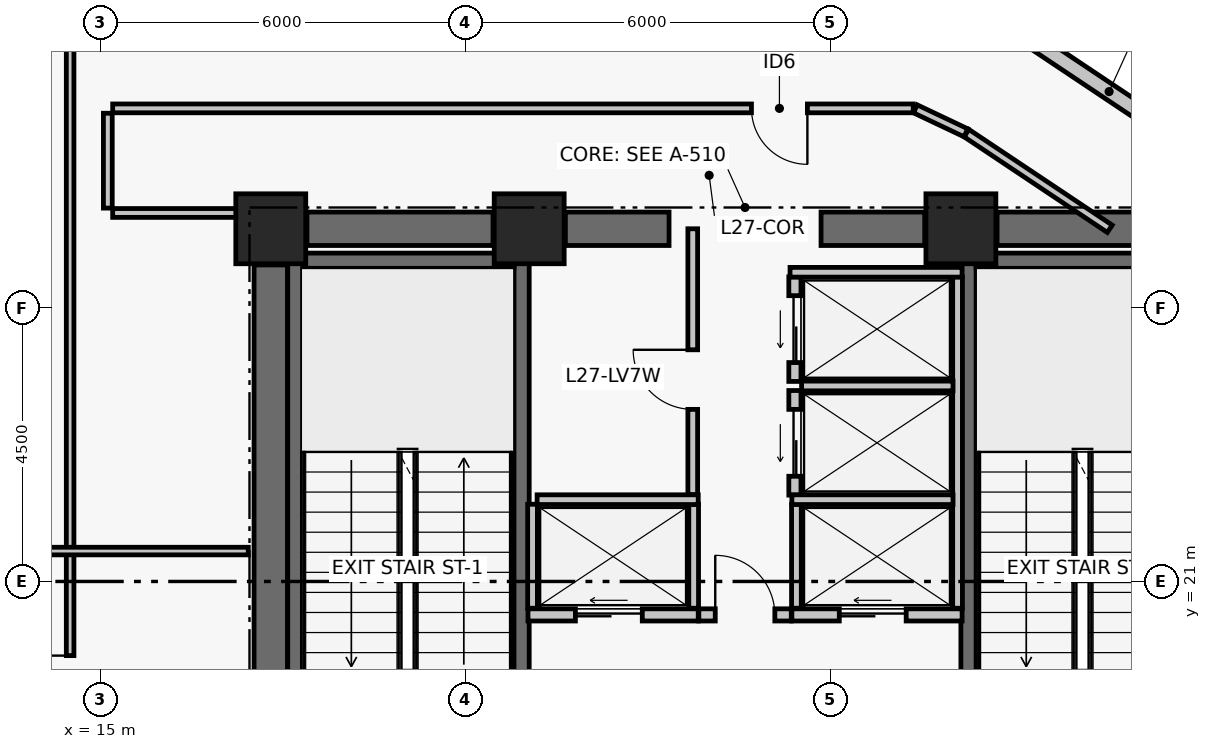
"""IFC4 building model, lengths in metres.
Left out: names, types, materials, properties, quantities, classifications, styles, units other than length and angle.
Written with IfcOpenShell. Run it as: python <this file> out.ifc"""

import sys

from ifc_helpers import new_model, si_unit, direction, frame, frame_2d, origin, origin_2d, place, context, subcontext, project, spatial, rectangle, extrude, element, fill, save


model = new_model("IFC4")
c1 = context("Model", 3, precision=1e-05, world=origin(), true_north=direction((0.0, 1.0)))
c2 = subcontext(c1, "Body", "Model", "MODEL_VIEW")
j1 = project(units=[si_unit("LENGTHUNIT", "METRE"), si_unit("PLANEANGLEUNIT", "RADIAN")], contexts=[c1])
p1 = place(None, origin())
s1 = spatial("IfcSite", under=j1, at=p1, CompositionType="ELEMENT")
p2 = place(p1, origin())
s2 = spatial("IfcBuilding", under=s1, at=p2, CompositionType="ELEMENT")
p3 = place(p2, frame((0.0, 0.0, 111.42)))
s3 = spatial("IfcBuildingStorey", under=s2, at=p3, CompositionType="ELEMENT", Elevation=111.42)
for number, where, z_axis, x_axis in (
    (1, (17.8, 26.8, 0.0), (0.0, 0.0, 1.0), (1.0, 0.0, 0.0)),
    (2, (22.05, 26.8, 0.0), (0.0, 0.0, 1.0), (1.0, 0.0, 0.0)),
    (3, (29.15, 26.8, 0.0), (0.0, 0.0, 1.0), (1.0, 0.0, 0.0)),
):
    element("IfcColumn", number, at=place(p3, frame(where, z_axis=z_axis, x_axis=x_axis)), inside=s3, PredefinedType="COLUMN", context=c2, shape_type="SweptSolid", body=[
        extrude(rectangle(XDim=1.15, YDim=1.15, at=origin_2d()), origin(), (0.0, 0.0, 1.0), 3.72),
    ])
p4 = place(p3, frame((18.395, 26.8, 0.0), z_axis=(0.0, 0.0, 1.0), x_axis=(1.0, 0.0, 0.0)))
e4 = element("IfcWall", 4, at=p4, inside=s3, PredefinedType="SHEAR", context=c2, shape_type="SweptSolid", body=[
    extrude(rectangle(XDim=3.06, YDim=0.55, at=frame_2d((1.53, 0.0))), origin(), (0.0, 0.0, 1.0), 3.47),
])
p5 = place(p3, frame((22.645, 26.8, 0.0), z_axis=(0.0, 0.0, 1.0), x_axis=(1.0, 0.0, 0.0)))
e5 = element("IfcWall", 5, at=p5, inside=s3, PredefinedType="SHEAR", context=c2, shape_type="SweptSolid", body=[
    extrude(rectangle(XDim=1.705, YDim=0.55, at=frame_2d((0.853, 0.0))), origin(), (0.0, 0.0, 1.0), 3.47),
])
p6 = place(p3, frame((26.85, 26.8, 0.0), z_axis=(0.0, 0.0, 1.0), x_axis=(1.0, 0.0, 0.0)))
e6 = element("IfcWall", 6, at=p6, inside=s3, PredefinedType="SHEAR", context=c2, shape_type="SweptSolid", body=[
    extrude(rectangle(XDim=1.705, YDim=0.55, at=frame_2d((0.853, 0.0))), origin(), (0.0, 0.0, 1.0), 3.47),
])
p7 = place(p3, frame((29.745, 26.8, 0.0), z_axis=(0.0, 0.0, 1.0), x_axis=(1.0, 0.0, 0.0)))
e7 = element("IfcWall", 7, at=p7, inside=s3, PredefinedType="SHEAR", context=c2, shape_type="SweptSolid", body=[
    extrude(rectangle(XDim=3.06, YDim=0.55, at=frame_2d((1.53, 0.0))), origin(), (0.0, 0.0, 1.0), 3.47),
])
p8 = place(p3, frame((17.8, 17.795, 0.0), z_axis=(0.0, 0.0, 1.0), x_axis=(0.0, 1.0, 0.0)))
e8 = element("IfcWall", 8, at=p8, inside=s3, PredefinedType="SHEAR", context=c2, shape_type="SweptSolid", body=[
    extrude(rectangle(XDim=8.41, YDim=0.55, at=frame_2d((4.205, 0.0))), origin(), (0.0, 0.0, 1.0), 3.47),
])
p9 = place(p3, frame((18.204, 17.6, 0.0), z_axis=(0.0, 0.0, 1.0), x_axis=(0.0, 1.0, 0.0)))
e9 = element("IfcWall", 9, at=p9, inside=s3, PredefinedType="SHEAR", context=c2, shape_type="SweptSolid", body=[
    extrude(rectangle(XDim=8.8, YDim=0.25, at=frame_2d((4.4, 0.0))), origin(), (0.0, 0.0, 1.0), 3.47),
])
p10 = place(p3, frame((21.925, 17.6, 0.0), z_axis=(0.0, 0.0, 1.0), x_axis=(0.0, 1.0, 0.0)))
e10 = element("IfcWall", 10, at=p10, inside=s3, PredefinedType="SHEAR", context=c2, shape_type="SweptSolid", body=[
    extrude(rectangle(XDim=8.8, YDim=0.25, at=frame_2d((4.4, 0.0))), origin(), (0.0, 0.0, 1.0), 3.47),
])
p11 = place(p10, frame((0.35, 0.0, 0.0)))
e11 = element("IfcOpeningElement", 11, at=p11, cuts=e10, PredefinedType="OPENING", context=c2, shape_type="SweptSolid", body=[
    extrude(rectangle(XDim=1.05, YDim=2.08, at=frame_2d((0.525, 1.04))), frame((0.0, 0.135, 0.0), z_axis=(0.0, -1.0, 0.0), x_axis=(1.0, 0.0, 0.0)), (0.0, 0.0, 1.0), 0.27),
])
p12 = place(p3, frame((18.329, 26.275, 0.0), z_axis=(0.0, 0.0, 1.0), x_axis=(1.0, 0.0, 0.0)))
e12 = element("IfcWall", 12, at=p12, inside=s3, PredefinedType="SHEAR", context=c2, shape_type="SweptSolid", body=[
    extrude(rectangle(XDim=3.471, YDim=0.25, at=frame_2d((1.735, 0.0))), origin(), (0.0, 0.0, 1.0), 3.47),
])
p13 = place(p3, frame((29.275, 17.6, 0.0), z_axis=(0.0, 0.0, 1.0), x_axis=(0.0, 1.0, 0.0)))
e13 = element("IfcWall", 13, at=p13, inside=s3, PredefinedType="SHEAR", context=c2, shape_type="SweptSolid", body=[
    extrude(rectangle(XDim=8.8, YDim=0.25, at=frame_2d((4.4, 0.0))), origin(), (0.0, 0.0, 1.0), 3.47),
])
p14 = place(p13, frame((0.35, 0.0, 0.0)))
e14 = element("IfcOpeningElement", 14, at=p14, cuts=e13, PredefinedType="OPENING", context=c2, shape_type="SweptSolid", body=[
    extrude(rectangle(XDim=1.05, YDim=2.08, at=frame_2d((0.525, 1.04))), frame((0.0, 0.135, 0.0), z_axis=(0.0, -1.0, 0.0), x_axis=(1.0, 0.0, 0.0)), (0.0, 0.0, 1.0), 0.27),
])
p15 = place(p3, frame((29.4, 26.275, 0.0), z_axis=(0.0, 0.0, 1.0), x_axis=(1.0, 0.0, 0.0)))
e15 = element("IfcWall", 15, at=p15, inside=s3, PredefinedType="SHEAR", context=c2, shape_type="SweptSolid", body=[
    extrude(rectangle(XDim=3.471, YDim=0.25, at=frame_2d((1.736, 0.0))), origin(), (0.0, 0.0, 1.0), 3.47),
])
p16 = place(p3, frame((30.07, 30.069, 0.0), z_axis=(0.0, 0.0, 1.0), x_axis=(0.831720838908, -0.555194061681, 0.0)))
e16 = element("IfcWall", 16, at=p16, inside=s3, PredefinedType="PARTITIONING", context=c2, shape_type="SweptSolid", body=[
    extrude(rectangle(XDim=3.65, YDim=0.26, at=frame_2d((1.825, 0.0))), origin(), (0.0, 0.0, 1.0), 2.9),
])
p17 = place(p3, frame((24.84, 20.45, 0.0), z_axis=(0.0, 0.0, 1.0), x_axis=(1.0, 0.0, 0.0)))
e17 = element("IfcWall", 17, at=p17, inside=s3, PredefinedType="PARTITIONING", context=c2, shape_type="SweptSolid", body=[
    extrude(rectangle(XDim=1.52, YDim=0.2, at=frame_2d((0.76, 0.0))), origin(), (0.0, 0.0, 1.0), 3.47),
])
p18 = place(p17, frame((0.27, 0.0, 0.0)))
e18 = element("IfcOpeningElement", 18, at=p18, cuts=e17, PredefinedType="OPENING", context=c2, shape_type="SweptSolid", body=[
    extrude(rectangle(XDim=0.98, YDim=2.06, at=frame_2d((0.49, 1.03))), frame((0.0, 0.11, 0.0), z_axis=(0.0, -1.0, 0.0), x_axis=(1.0, 0.0, 0.0)), (0.0, 0.0, 1.0), 0.22),
])
p19 = place(p3, frame((22.03, 20.45, 0.0), z_axis=(0.0, 0.0, 1.0), x_axis=(1.0, 0.0, 0.0)))
e19 = element("IfcWall", 19, at=p19, inside=s3, PredefinedType="PARTITIONING", context=c2, shape_type="SweptSolid", body=[
    extrude(rectangle(XDim=2.8, YDim=0.2, at=frame_2d((1.4, 0.0))), origin(), (0.0, 0.0, 1.0), 3.47),
])
p20 = place(p19, frame((0.78, 0.0, 0.0)))
e20 = element("IfcOpeningElement", 20, at=p20, cuts=e19, PredefinedType="OPENING", context=c2, shape_type="SweptSolid", body=[
    extrude(rectangle(XDim=1.1, YDim=2.08, at=frame_2d((0.55, 1.04))), frame((0.0, 0.11, 0.0), z_axis=(0.0, -1.0, 0.0), x_axis=(1.0, 0.0, 0.0)), (0.0, 0.0, 1.0), 0.22),
])
p21 = place(p3, frame((26.37, 20.45, 0.0), z_axis=(0.0, 0.0, 1.0), x_axis=(1.0, 0.0, 0.0)))
e21 = element("IfcWall", 21, at=p21, inside=s3, PredefinedType="PARTITIONING", context=c2, shape_type="SweptSolid", body=[
    extrude(rectangle(XDim=2.8, YDim=0.2, at=frame_2d((1.4, 0.0))), origin(), (0.0, 0.0, 1.0), 3.47),
])
p22 = place(p21, frame((0.78, 0.0, 0.0)))
e22 = element("IfcOpeningElement", 22, at=p22, cuts=e21, PredefinedType="OPENING", context=c2, shape_type="SweptSolid", body=[
    extrude(rectangle(XDim=1.1, YDim=2.08, at=frame_2d((0.55, 1.04))), frame((0.0, 0.11, 0.0), z_axis=(0.0, -1.0, 0.0), x_axis=(1.0, 0.0, 0.0)), (0.0, 0.0, 1.0), 0.22),
])
p23 = place(p3, frame((26.42, 22.42, 0.0), z_axis=(0.0, 0.0, 1.0), x_axis=(0.0, 1.0, 0.0)))
e23 = element("IfcWall", 23, at=p23, inside=s3, PredefinedType="PARTITIONING", context=c2, shape_type="SweptSolid", body=[
    extrude(rectangle(XDim=1.72, YDim=0.2, at=frame_2d((0.86, 0.0))), origin(), (0.0, 0.0, 1.0), 3.47),
])
p24 = place(p23, frame((0.31, 0.0, 0.0)))
e24 = element("IfcOpeningElement", 24, at=p24, cuts=e23, PredefinedType="OPENING", context=c2, shape_type="SweptSolid", body=[
    extrude(rectangle(XDim=1.1, YDim=2.08, at=frame_2d((0.55, 1.04))), frame((0.0, 0.11, 0.0), z_axis=(0.0, -1.0, 0.0), x_axis=(1.0, 0.0, 0.0)), (0.0, 0.0, 1.0), 0.22),
])
p25 = place(p3, frame((26.42, 24.29, 0.0), z_axis=(0.0, 0.0, 1.0), x_axis=(0.0, 1.0, 0.0)))
e25 = element("IfcWall", 25, at=p25, inside=s3, PredefinedType="PARTITIONING", context=c2, shape_type="SweptSolid", body=[
    extrude(rectangle(XDim=1.72, YDim=0.2, at=frame_2d((0.86, 0.0))), origin(), (0.0, 0.0, 1.0), 3.47),
])
p26 = place(p25, frame((0.31, 0.0, 0.0)))
e26 = element("IfcOpeningElement", 26, at=p26, cuts=e25, PredefinedType="OPENING", context=c2, shape_type="SweptSolid", body=[
    extrude(rectangle(XDim=1.1, YDim=2.08, at=frame_2d((0.55, 1.04))), frame((0.0, 0.11, 0.0), z_axis=(0.0, -1.0, 0.0), x_axis=(1.0, 0.0, 0.0)), (0.0, 0.0, 1.0), 0.22),
])
for number, where, z_axis, x_axis in (
    (27, (22.105, 20.56, 0.0), (0.0, 0.0, 1.0), (0.0, 1.0, 0.0)),
    (28, (24.755, 20.56, 0.0), (0.0, 0.0, 1.0), (0.0, 1.0, 0.0)),
):
    element("IfcWall", number, at=place(p3, frame(where, z_axis=z_axis, x_axis=x_axis)), inside=s3, PredefinedType="PARTITIONING", context=c2, shape_type="SweptSolid", body=[
        extrude(rectangle(XDim=1.71, YDim=0.16, at=frame_2d((0.855, 0.0))), origin(), (0.0, 0.0, 1.0), 3.47),
    ])
p27 = place(p3, frame((22.18, 22.345, 0.0), z_axis=(0.0, 0.0, 1.0), x_axis=(1.0, 0.0, 0.0)))
e29 = element("IfcWall", 29, at=p27, inside=s3, PredefinedType="PARTITIONING", context=c2, shape_type="SweptSolid", body=[
    extrude(rectangle(XDim=2.65, YDim=0.16, at=frame_2d((1.325, 0.0))), origin(), (0.0, 0.0, 1.0), 3.47),
])
p28 = place(p3, frame((29.095, 20.56, 0.0), z_axis=(0.0, 0.0, 1.0), x_axis=(0.0, 1.0, 0.0)))
e30 = element("IfcWall", 30, at=p28, inside=s3, PredefinedType="PARTITIONING", context=c2, shape_type="SweptSolid", body=[
    extrude(rectangle(XDim=5.45, YDim=0.16, at=frame_2d((2.725, 0.0))), origin(), (0.0, 0.0, 1.0), 3.47),
])
p29 = place(p3, frame((26.445, 20.56, 0.0), z_axis=(0.0, 0.0, 1.0), x_axis=(0.0, 1.0, 0.0)))
e31 = element("IfcWall", 31, at=p29, inside=s3, PredefinedType="PARTITIONING", context=c2, shape_type="SweptSolid", body=[
    extrude(rectangle(XDim=1.71, YDim=0.16, at=frame_2d((0.855, 0.0))), origin(), (0.0, 0.0, 1.0), 3.47),
])
p30 = place(p3, frame((26.37, 22.345, 0.0), z_axis=(0.0, 0.0, 1.0), x_axis=(1.0, 0.0, 0.0)))
e32 = element("IfcWall", 32, at=p30, inside=s3, PredefinedType="PARTITIONING", context=c2, shape_type="SweptSolid", body=[
    extrude(rectangle(XDim=2.65, YDim=0.16, at=frame_2d((1.325, 0.0))), origin(), (0.0, 0.0, 1.0), 3.47),
])
p31 = place(p3, frame((26.53, 24.215, 0.0), z_axis=(0.0, 0.0, 1.0), x_axis=(1.0, 0.0, 0.0)))
e33 = element("IfcWall", 33, at=p31, inside=s3, PredefinedType="PARTITIONING", context=c2, shape_type="SweptSolid", body=[
    extrude(rectangle(XDim=2.49, YDim=0.16, at=frame_2d((1.245, 0.0))), origin(), (0.0, 0.0, 1.0), 3.47),
])
p32 = place(p3, frame((26.34, 26.085, 0.0), z_axis=(0.0, 0.0, 1.0), x_axis=(1.0, 0.0, 0.0)))
e34 = element("IfcWall", 34, at=p32, inside=s3, PredefinedType="PARTITIONING", context=c2, shape_type="SweptSolid", body=[
    extrude(rectangle(XDim=2.83, YDim=0.16, at=frame_2d((1.415, 0.0))), origin(), (0.0, 0.0, 1.0), 3.47),
])
p33 = place(p3, frame((24.74, 22.43, 0.0), z_axis=(0.0, 0.0, 1.0), x_axis=(0.0, 1.0, 0.0)))
e35 = element("IfcWall", 35, at=p33, inside=s3, PredefinedType="PARTITIONING", context=c2, shape_type="SweptSolid", body=[
    extrude(rectangle(XDim=4.37, YDim=0.16, at=frame_2d((2.185, 0.0))), origin(), (0.0, 0.0, 1.0), 2.6),
])
p34 = place(p33, frame((1.4, 0.0, 0.0)))
e36 = element("IfcOpeningElement", 36, at=p34, cuts=e35, PredefinedType="OPENING", context=c2, shape_type="SweptSolid", body=[
    extrude(rectangle(XDim=0.98, YDim=2.06, at=frame_2d((0.49, 1.03))), frame((0.0, 0.09, 0.0), z_axis=(0.0, -1.0, 0.0), x_axis=(1.0, 0.0, 0.0)), (0.0, 0.0, 1.0), 0.18),
])
p35 = place(p3, frame((31.598, 26.8, 0.0), z_axis=(0.0, 0.0, 1.0), x_axis=(-0.831758510993, 0.555137622028, 0.0)))
e37 = element("IfcWall", 37, at=p35, inside=s3, PredefinedType="PARTITIONING", context=c2, shape_type="SweptSolid", body=[
    extrude(rectangle(XDim=2.833, YDim=0.145, at=frame_2d((1.417, 0.0))), origin(), (0.0, 0.0, 1.0), 2.6),
])
p36 = place(p3, frame((29.232, 28.379, 0.0), z_axis=(0.0, 0.0, 1.0), x_axis=(-0.903829701814, 0.427892358098, 0.0)))
e38 = element("IfcWall", 38, at=p36, inside=s3, PredefinedType="PARTITIONING", context=c2, shape_type="SweptSolid", body=[
    extrude(rectangle(XDim=0.92, YDim=0.145, at=frame_2d((0.46, 0.0))), origin(), (0.0, 0.0, 1.0), 3.47),
])
p37 = place(p3, frame((28.366, 28.78, 0.0), z_axis=(0.0, 0.0, 1.0), x_axis=(-1.0, 0.0, 0.0)))
e39 = element("IfcWall", 39, at=p37, inside=s3, PredefinedType="PARTITIONING", context=c2, shape_type="SweptSolid", body=[
    extrude(rectangle(XDim=13.166, YDim=0.145, at=frame_2d((6.583, 0.0))), origin(), (0.0, 0.0, 1.0), 2.65),
])
p38 = place(p37, frame((1.741, 0.0, 0.0)))
e40 = element("IfcOpeningElement", 40, at=p38, cuts=e39, PredefinedType="OPENING", context=c2, shape_type="SweptSolid", body=[
    extrude(rectangle(XDim=0.92, YDim=2.05, at=frame_2d((0.46, 1.025))), frame((0.0, 0.083, 0.0), z_axis=(0.0, -1.0, 0.0), x_axis=(1.0, 0.0, 0.0)), (0.0, 0.0, 1.0), 0.165),
])
p39 = place(p3, frame((15.12, 28.7, 0.0), z_axis=(0.0, 0.0, 1.0), x_axis=(0.0, -1.0, 0.0)))
e41 = element("IfcWall", 41, at=p39, inside=s3, PredefinedType="PARTITIONING", context=c2, shape_type="SweptSolid", body=[
    extrude(rectangle(XDim=1.56, YDim=0.145, at=frame_2d((0.78, 0.0))), origin(), (0.0, 0.0, 1.0), 2.65),
])
p40 = place(p3, frame((15.2, 27.06, 0.0), z_axis=(0.0, 0.0, 1.0), x_axis=(1.0, 0.0, 0.0)))
e42 = element("IfcWall", 42, at=p40, inside=s3, PredefinedType="PARTITIONING", context=c2, shape_type="SweptSolid", body=[
    extrude(rectangle(XDim=2.18, YDim=0.145, at=frame_2d((1.09, 0.0))), origin(), (0.0, 0.0, 1.0), 2.65),
])
p41 = place(p3, frame((14.5, 7.535, 0.0), z_axis=(0.0, 0.0, 1.0), x_axis=(0.0, 1.0, 0.0)))
e43 = element("IfcWall", 43, at=p41, inside=s3, PredefinedType="PARTITIONING", context=c2, shape_type="SweptSolid", body=[
    extrude(rectangle(XDim=28.648, YDim=0.125, at=frame_2d((14.324, 0.0))), origin(), (0.0, 0.0, 1.0), 2.2),
])
p42 = place(p41, frame((11.325, 0.0, 0.0)))
e44 = element("IfcOpeningElement", 44, at=p42, cuts=e43, PredefinedType="OPENING", context=c2, shape_type="SweptSolid", body=[
    extrude(rectangle(XDim=0.92, YDim=2.05, at=frame_2d((0.46, 1.025))), frame((0.0, 0.073, 0.0), z_axis=(0.0, -1.0, 0.0), x_axis=(1.0, 0.0, 0.0)), (0.0, 0.0, 1.0), 0.145),
])
p43 = place(p3, frame((3.128, 21.5, 0.0), z_axis=(0.0, 0.0, 1.0), x_axis=(1.0, 0.0, 0.0)))
e45 = element("IfcWall", 45, at=p43, inside=s3, PredefinedType="PARTITIONING", context=c2, shape_type="SweptSolid", body=[
    extrude(rectangle(XDim=14.302, YDim=0.125, at=frame_2d((7.151, 0.0))), origin(), (0.0, 0.0, 1.0), 2.6),
])
p44 = place(p43, frame((0.28, 0.0, 0.0)))
e46 = element("IfcOpeningElement", 46, at=p44, cuts=e45, PredefinedType="OPENING", context=c2, shape_type="SweptSolid", body=[
    extrude(rectangle(XDim=0.92, YDim=2.05, at=frame_2d((0.46, 1.025))), frame((0.0, 0.073, 0.0), z_axis=(0.0, -1.0, 0.0), x_axis=(1.0, 0.0, 0.0)), (0.0, 0.0, 1.0), 0.145),
])
p45 = place(p18, origin())
e47 = element("IfcDoor", 47, at=p45, inside=s3, OperationType="SINGLE_SWING_LEFT", PredefinedType="DOOR", context=c2, shape_type="SweptSolid", body=[
    extrude(rectangle(XDim=0.98, YDim=2.06, at=frame_2d((0.49, 1.03))), frame((0.0, 0.025, 0.0), z_axis=(0.0, -1.0, 0.0), x_axis=(1.0, 0.0, 0.0)), (0.0, 0.0, 1.0), 0.05),
])
fill(e18, e47)
p46 = place(p20, origin())
e48 = element("IfcDoor", 48, at=p46, inside=s3, OperationType="DOUBLE_DOOR_SLIDING", PredefinedType="DOOR", context=c2, shape_type="SweptSolid", body=[
    extrude(rectangle(XDim=1.1, YDim=2.08, at=frame_2d((0.55, 1.04))), frame((0.0, 0.025, 0.0), z_axis=(0.0, -1.0, 0.0), x_axis=(1.0, 0.0, 0.0)), (0.0, 0.0, 1.0), 0.05),
])
fill(e20, e48)
p47 = place(p22, origin())
e49 = element("IfcDoor", 49, at=p47, inside=s3, OperationType="DOUBLE_DOOR_SLIDING", PredefinedType="DOOR", context=c2, shape_type="SweptSolid", body=[
    extrude(rectangle(XDim=1.1, YDim=2.08, at=frame_2d((0.55, 1.04))), frame((0.0, 0.025, 0.0), z_axis=(0.0, -1.0, 0.0), x_axis=(1.0, 0.0, 0.0)), (0.0, 0.0, 1.0), 0.05),
])
fill(e22, e49)
p48 = place(p24, origin())
e50 = element("IfcDoor", 50, at=p48, inside=s3, OperationType="DOUBLE_DOOR_SLIDING", PredefinedType="DOOR", context=c2, shape_type="SweptSolid", body=[
    extrude(rectangle(XDim=1.1, YDim=2.08, at=frame_2d((0.55, 1.04))), frame((0.0, 0.025, 0.0), z_axis=(0.0, -1.0, 0.0), x_axis=(1.0, 0.0, 0.0)), (0.0, 0.0, 1.0), 0.05),
])
fill(e24, e50)
p49 = place(p26, origin())
e51 = element("IfcDoor", 51, at=p49, inside=s3, OperationType="DOUBLE_DOOR_SLIDING", PredefinedType="DOOR", context=c2, shape_type="SweptSolid", body=[
    extrude(rectangle(XDim=1.1, YDim=2.08, at=frame_2d((0.55, 1.04))), frame((0.0, 0.025, 0.0), z_axis=(0.0, -1.0, 0.0), x_axis=(1.0, 0.0, 0.0)), (0.0, 0.0, 1.0), 0.05),
])
fill(e26, e51)
p50 = place(p34, origin())
e52 = element("IfcDoor", 52, at=p50, inside=s3, OperationType="SINGLE_SWING_RIGHT", PredefinedType="DOOR", context=c2, shape_type="SweptSolid", body=[
    extrude(rectangle(XDim=0.98, YDim=2.06, at=frame_2d((0.49, 1.03))), frame((0.0, 0.025, 0.0), z_axis=(0.0, -1.0, 0.0), x_axis=(1.0, 0.0, 0.0)), (0.0, 0.0, 1.0), 0.05),
])
fill(e36, e52)
p51 = place(p38, origin())
e53 = element("IfcDoor", 53, at=p51, inside=s3, OperationType="SINGLE_SWING_LEFT", PredefinedType="DOOR", context=c2, shape_type="SweptSolid", body=[
    extrude(rectangle(XDim=0.92, YDim=2.05, at=frame_2d((0.46, 1.025))), frame((0.0, 0.025, 0.0), z_axis=(0.0, -1.0, 0.0), x_axis=(1.0, 0.0, 0.0)), (0.0, 0.0, 1.0), 0.05),
])
fill(e40, e53)
p52 = place(p42, origin())
e54 = element("IfcDoor", 54, at=p52, inside=s3, OperationType="SINGLE_SWING_RIGHT", PredefinedType="DOOR", context=c2, shape_type="SweptSolid", body=[
    extrude(rectangle(XDim=0.92, YDim=2.05, at=frame_2d((0.46, 1.025))), frame((0.0, 0.025, 0.0), z_axis=(0.0, -1.0, 0.0), x_axis=(1.0, 0.0, 0.0)), (0.0, 0.0, 1.0), 0.05),
])
fill(e44, e54)
save(model, sys.argv[1])
